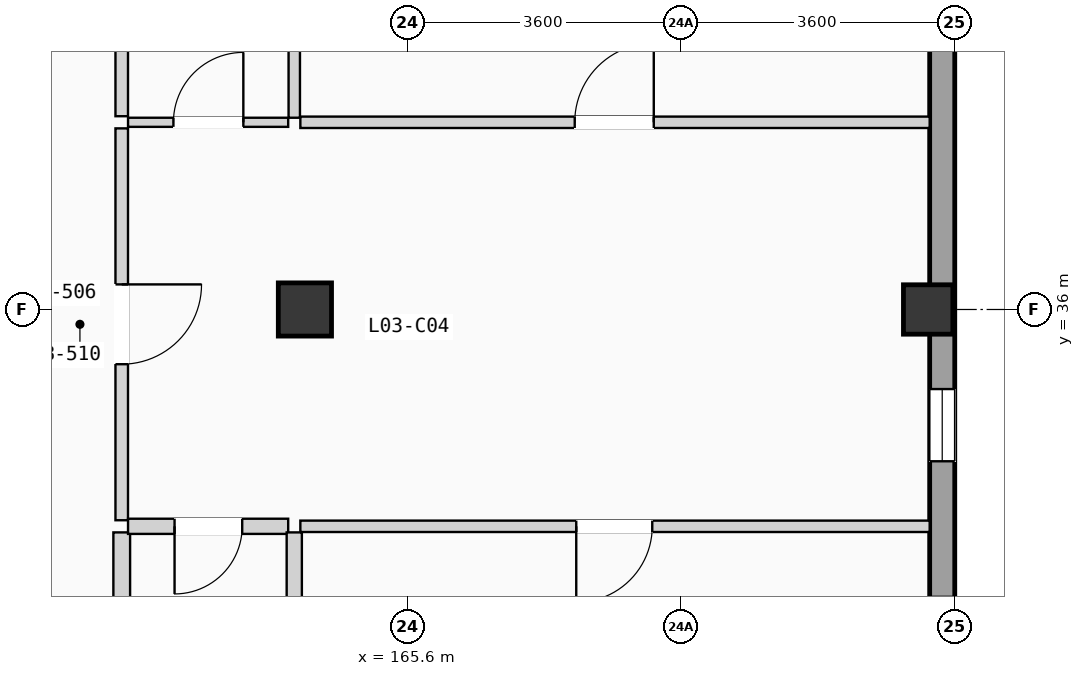
"""IFC4 building model, lengths in metres.
Left out: names, types, materials, properties, quantities, classifications, styles, units other than length and angle.
Written with IfcOpenShell. Run it as: python <this file> out.ifc"""

import sys

from ifc_helpers import new_model, si_unit, direction, frame, frame_2d, origin, origin_2d, place, context, subcontext, project, spatial, rectangle, extrude, element, fill, save


model = new_model("IFC4")
c1 = context("Model", 3, precision=1e-05, world=origin(), true_north=direction((0.0, 1.0)))
c2 = subcontext(c1, "Body", "Model", "MODEL_VIEW")
j1 = project(units=[si_unit("LENGTHUNIT", "METRE"), si_unit("PLANEANGLEUNIT", "RADIAN")], contexts=[c1])
p1 = place(None, origin())
s1 = spatial("IfcSite", under=j1, at=p1, CompositionType="ELEMENT")
p2 = place(p1, origin())
s2 = spatial("IfcBuilding", under=s1, at=p2, CompositionType="ELEMENT")
p3 = place(p2, frame((0.0, 0.0, 12.075)))
s3 = spatial("IfcBuildingStorey", under=s2, at=p3, CompositionType="ELEMENT", Elevation=12.075)
p4 = place(p3, frame((164.25, 36.0, 0.0), z_axis=(0.0, 0.0, 1.0), x_axis=(1.0, 0.0, 0.0)))
e1 = element("IfcColumn", 1, at=p4, inside=s3, PredefinedType="COLUMN", context=c2, shape_type="SweptSolid", body=[
    extrude(rectangle(XDim=0.7, YDim=0.7, at=origin_2d()), origin(), (0.0, 0.0, 1.0), 3.15),
])
p5 = place(p3, frame((172.45, 36.0, 0.0), z_axis=(0.0, 0.0, 1.0), x_axis=(1.0, 0.0, 0.0)))
e2 = element("IfcColumn", 2, at=p5, inside=s3, PredefinedType="COLUMN", context=c2, shape_type="SweptSolid", body=[
    extrude(rectangle(XDim=0.65, YDim=0.65, at=origin_2d()), origin(), (0.0, 0.0, 1.0), 3.15),
])
p6 = place(p3, frame((172.635, 0.33, 0.0), z_axis=(0.0, 0.0, 1.0), x_axis=(0.0, 1.0, 0.0)))
e3 = element("IfcWall", 3, at=p6, inside=s3, PredefinedType="SOLIDWALL", context=c2, shape_type="SweptSolid", body=[
    extrude(rectangle(XDim=49.74, YDim=0.33, at=frame_2d((24.87, 0.0))), origin(), (0.0, 0.0, 1.0), 2.89),
])
p7 = place(p6, frame((9.46, 0.0, 0.705)))
e4 = element("IfcOpeningElement", 4, at=p7, cuts=e3, PredefinedType="OPENING", context=c2, shape_type="SweptSolid", body=[
    extrude(rectangle(XDim=2.15, YDim=1.5, at=frame_2d((1.075, 0.75))), frame((0.0, 0.175, 0.0), z_axis=(0.0, -1.0, 0.0), x_axis=(1.0, 0.0, 0.0)), (0.0, 0.0, 1.0), 0.35),
])
p8 = place(p6, frame((16.61, 0.0, 0.555)))
e5 = element("IfcOpeningElement", 5, at=p8, cuts=e3, PredefinedType="OPENING", context=c2, shape_type="SweptSolid", body=[
    extrude(rectangle(XDim=2.15, YDim=1.65, at=frame_2d((1.075, 0.825))), frame((0.0, 0.175, 0.0), z_axis=(0.0, -1.0, 0.0), x_axis=(1.0, 0.0, 0.0)), (0.0, 0.0, 1.0), 0.35),
])
p9 = place(p6, frame((24.395, 0.0, 0.85)))
e6 = element("IfcOpeningElement", 6, at=p9, cuts=e3, PredefinedType="OPENING", context=c2, shape_type="SweptSolid", body=[
    extrude(rectangle(XDim=0.95, YDim=1.2, at=frame_2d((0.475, 0.6))), frame((0.0, 0.175, 0.0), z_axis=(0.0, -1.0, 0.0), x_axis=(1.0, 0.0, 0.0)), (0.0, 0.0, 1.0), 0.35),
])
p10 = place(p6, frame((33.673, 0.0, 0.85)))
e7 = element("IfcOpeningElement", 7, at=p10, cuts=e3, PredefinedType="OPENING", context=c2, shape_type="SweptSolid", body=[
    extrude(rectangle(XDim=0.95, YDim=1.2, at=frame_2d((0.475, 0.6))), frame((0.0, 0.175, 0.0), z_axis=(0.0, -1.0, 0.0), x_axis=(1.0, 0.0, 0.0)), (0.0, 0.0, 1.0), 0.35),
])
p11 = place(p6, frame((29.589, 0.0, 0.855)))
e8 = element("IfcOpeningElement", 8, at=p11, cuts=e3, PredefinedType="OPENING", context=c2, shape_type="SweptSolid", body=[
    extrude(rectangle(XDim=2.3, YDim=1.35, at=frame_2d((1.15, 0.675))), frame((0.0, 0.175, 0.0), z_axis=(0.0, -1.0, 0.0), x_axis=(1.0, 0.0, 0.0)), (0.0, 0.0, 1.0), 0.35),
])
p12 = place(p6, frame((39.191, 0.0, 0.705)))
e9 = element("IfcOpeningElement", 9, at=p12, cuts=e3, PredefinedType="OPENING", context=c2, shape_type="SweptSolid", body=[
    extrude(rectangle(XDim=2.3, YDim=1.5, at=frame_2d((1.15, 0.75))), frame((0.0, 0.175, 0.0), z_axis=(0.0, -1.0, 0.0), x_axis=(1.0, 0.0, 0.0)), (0.0, 0.0, 1.0), 0.35),
])
p13 = place(p3, frame((161.84, 33.227, 0.0), z_axis=(0.0, 0.0, 1.0), x_axis=(0.0, 1.0, 0.0)))
e10 = element("IfcWall", 10, at=p13, inside=s3, PredefinedType="PARTITIONING", context=c2, shape_type="SweptSolid", body=[
    extrude(rectangle(XDim=5.156, YDim=0.165, at=frame_2d((2.578, 0.0))), origin(), (0.0, 0.0, 1.0), 2.87),
])
p14 = place(p13, frame((2.053, 0.0, 0.0)))
e11 = element("IfcOpeningElement", 11, at=p14, cuts=e10, PredefinedType="OPENING", context=c2, shape_type="SweptSolid", body=[
    extrude(rectangle(XDim=1.05, YDim=2.13, at=frame_2d((0.525, 1.065))), frame((0.0, 0.093, 0.0), z_axis=(0.0, -1.0, 0.0), x_axis=(1.0, 0.0, 0.0)), (0.0, 0.0, 1.0), 0.185),
])
p15 = place(p3, frame((161.84, 28.81, 0.0), z_axis=(0.0, 0.0, 1.0), x_axis=(0.0, 1.0, 0.0)))
e12 = element("IfcWall", 12, at=p15, inside=s3, PredefinedType="PLUMBINGWALL", context=c2, shape_type="SweptSolid", body=[
    extrude(rectangle(XDim=4.257, YDim=0.22, at=frame_2d((2.128, 0.0))), origin(), (0.0, 0.0, 1.0), 2.87),
])
p16 = place(p3, frame((161.84, 38.543, 0.0), z_axis=(0.0, 0.0, 1.0), x_axis=(0.0, 1.0, 0.0)))
e13 = element("IfcWall", 13, at=p16, inside=s3, PredefinedType="PARTITIONING", context=c2, shape_type="SweptSolid", body=[
    extrude(rectangle(XDim=4.257, YDim=0.165, at=frame_2d((2.128, 0.0))), origin(), (0.0, 0.0, 1.0), 2.87),
])
p17 = place(p3, frame((161.923, 33.147, 0.0), z_axis=(0.0, 0.0, 1.0), x_axis=(1.0, 0.0, 0.0)))
e14 = element("IfcWall", 14, at=p17, inside=s3, PredefinedType="PLUMBINGWALL", context=c2, shape_type="SweptSolid", body=[
    extrude(rectangle(XDim=2.107, YDim=0.2, at=frame_2d((1.053, 0.0))), origin(), (0.0, 0.0, 1.0), 2.87),
])
p18 = place(p17, frame((0.612, 0.0, 0.0)))
e15 = element("IfcOpeningElement", 15, at=p18, cuts=e14, PredefinedType="OPENING", context=c2, shape_type="SweptSolid", body=[
    extrude(rectangle(XDim=0.89, YDim=2.03, at=frame_2d((0.445, 1.015))), frame((0.0, 0.11, 0.0), z_axis=(0.0, -1.0, 0.0), x_axis=(1.0, 0.0, 0.0)), (0.0, 0.0, 1.0), 0.22),
])
p19 = place(p3, frame((161.923, 38.463, 0.0), z_axis=(0.0, 0.0, 1.0), x_axis=(1.0, 0.0, 0.0)))
e16 = element("IfcWall", 16, at=p19, inside=s3, PredefinedType="PARTITIONING", context=c2, shape_type="SweptSolid", body=[
    extrude(rectangle(XDim=2.107, YDim=0.12, at=frame_2d((1.053, 0.0))), origin(), (0.0, 0.0, 1.0), 2.87),
])
p20 = place(p19, frame((0.597, 0.0, 0.0)))
e17 = element("IfcOpeningElement", 17, at=p20, cuts=e16, PredefinedType="OPENING", context=c2, shape_type="SweptSolid", body=[
    extrude(rectangle(XDim=0.92, YDim=2.02, at=frame_2d((0.46, 1.01))), frame((0.0, 0.07, 0.0), z_axis=(0.0, -1.0, 0.0), x_axis=(1.0, 0.0, 0.0)), (0.0, 0.0, 1.0), 0.14),
])
p21 = place(p3, frame((164.19, 33.147, 0.0), z_axis=(0.0, 0.0, 1.0), x_axis=(1.0, 0.0, 0.0)))
e18 = element("IfcWall", 18, at=p21, inside=s3, PredefinedType="PARTITIONING", context=c2, shape_type="SweptSolid", body=[
    extrude(rectangle(XDim=8.28, YDim=0.15, at=frame_2d((4.14, 0.0))), origin(), (0.0, 0.0, 1.0), 2.87),
])
p22 = place(p21, frame((3.63, 0.0, 0.0)))
e19 = element("IfcOpeningElement", 19, at=p22, cuts=e18, PredefinedType="OPENING", context=c2, shape_type="SweptSolid", body=[
    extrude(rectangle(XDim=1.0, YDim=2.06, at=frame_2d((0.5, 1.03))), frame((0.0, 0.085, 0.0), z_axis=(0.0, -1.0, 0.0), x_axis=(1.0, 0.0, 0.0)), (0.0, 0.0, 1.0), 0.17),
])
p23 = place(p3, frame((164.19, 38.463, 0.0), z_axis=(0.0, 0.0, 1.0), x_axis=(1.0, 0.0, 0.0)))
e20 = element("IfcWall", 20, at=p23, inside=s3, PredefinedType="PARTITIONING", context=c2, shape_type="SweptSolid", body=[
    extrude(rectangle(XDim=8.28, YDim=0.15, at=frame_2d((4.14, 0.0))), origin(), (0.0, 0.0, 1.0), 2.87),
])
p24 = place(p23, frame((3.61, 0.0, 0.0)))
e21 = element("IfcOpeningElement", 21, at=p24, cuts=e20, PredefinedType="OPENING", context=c2, shape_type="SweptSolid", body=[
    extrude(rectangle(XDim=1.04, YDim=2.08, at=frame_2d((0.52, 1.04))), frame((0.0, 0.085, 0.0), z_axis=(0.0, -1.0, 0.0), x_axis=(1.0, 0.0, 0.0)), (0.0, 0.0, 1.0), 0.17),
])
p25 = place(p3, frame((164.11, 28.81, 0.0), z_axis=(0.0, 0.0, 1.0), x_axis=(0.0, 1.0, 0.0)))
e22 = element("IfcWall", 22, at=p25, inside=s3, PredefinedType="PLUMBINGWALL", context=c2, shape_type="SweptSolid", body=[
    extrude(rectangle(XDim=4.257, YDim=0.2, at=frame_2d((2.128, 0.0))), origin(), (0.0, 0.0, 1.0), 2.87),
])
p26 = place(p3, frame((164.11, 38.523, 0.0), z_axis=(0.0, 0.0, 1.0), x_axis=(0.0, 1.0, 0.0)))
e23 = element("IfcWall", 23, at=p26, inside=s3, PredefinedType="PARTITIONING", context=c2, shape_type="SweptSolid", body=[
    extrude(rectangle(XDim=4.277, YDim=0.15, at=frame_2d((2.139, 0.0))), origin(), (0.0, 0.0, 1.0), 2.87),
])
p27 = place(p10, origin())
e24 = element("IfcWindow", 24, at=p27, inside=s3, PartitioningType="SINGLE_PANEL", PredefinedType="WINDOW", context=c2, shape_type="SweptSolid", body=[
    extrude(rectangle(XDim=0.95, YDim=1.2, at=frame_2d((0.475, 0.6))), frame((0.0, 0.03, 0.0), z_axis=(0.0, -1.0, 0.0), x_axis=(1.0, 0.0, 0.0)), (0.0, 0.0, 1.0), 0.06),
])
fill(e7, e24)
p28 = place(p14, frame((1.05, 0.0, 0.0), z_axis=(0.0, 0.0, 1.0), x_axis=(-1.0, 0.0, 0.0)))
e25 = element("IfcDoor", 25, at=p28, inside=s3, OperationType="SINGLE_SWING_RIGHT", PredefinedType="DOOR", context=c2, shape_type="SweptSolid", body=[
    extrude(rectangle(XDim=1.05, YDim=2.13, at=frame_2d((0.525, 1.065))), frame((0.0, 0.025, 0.0), z_axis=(0.0, -1.0, 0.0), x_axis=(1.0, 0.0, 0.0)), (0.0, 0.0, 1.0), 0.05),
])
fill(e11, e25)
p29 = place(p18, frame((0.89, 0.0, 0.0), z_axis=(0.0, 0.0, 1.0), x_axis=(-1.0, 0.0, 0.0)))
e26 = element("IfcDoor", 26, at=p29, inside=s3, OperationType="SINGLE_SWING_LEFT", PredefinedType="DOOR", context=c2, shape_type="SweptSolid", body=[
    extrude(rectangle(XDim=0.89, YDim=2.03, at=frame_2d((0.445, 1.015))), frame((0.0, 0.025, 0.0), z_axis=(0.0, -1.0, 0.0), x_axis=(1.0, 0.0, 0.0)), (0.0, 0.0, 1.0), 0.05),
])
fill(e15, e26)
p30 = place(p20, origin())
e27 = element("IfcDoor", 27, at=p30, inside=s3, OperationType="SINGLE_SWING_RIGHT", PredefinedType="DOOR", context=c2, shape_type="SweptSolid", body=[
    extrude(rectangle(XDim=0.92, YDim=2.02, at=frame_2d((0.46, 1.01))), frame((0.0, 0.025, 0.0), z_axis=(0.0, -1.0, 0.0), x_axis=(1.0, 0.0, 0.0)), (0.0, 0.0, 1.0), 0.05),
])
fill(e17, e27)
p31 = place(p22, frame((1.0, 0.0, 0.0), z_axis=(0.0, 0.0, 1.0), x_axis=(-1.0, 0.0, 0.0)))
e28 = element("IfcDoor", 28, at=p31, inside=s3, OperationType="SINGLE_SWING_LEFT", PredefinedType="DOOR", context=c2, shape_type="SweptSolid", body=[
    extrude(rectangle(XDim=1.0, YDim=2.06, at=frame_2d((0.5, 1.03))), frame((0.0, 0.025, 0.0), z_axis=(0.0, -1.0, 0.0), x_axis=(1.0, 0.0, 0.0)), (0.0, 0.0, 1.0), 0.05),
])
fill(e19, e28)
p32 = place(p24, origin())
e29 = element("IfcDoor", 29, at=p32, inside=s3, OperationType="SINGLE_SWING_RIGHT", PredefinedType="DOOR", context=c2, shape_type="SweptSolid", body=[
    extrude(rectangle(XDim=1.04, YDim=2.08, at=frame_2d((0.52, 1.04))), frame((0.0, 0.025, 0.0), z_axis=(0.0, -1.0, 0.0), x_axis=(1.0, 0.0, 0.0)), (0.0, 0.0, 1.0), 0.05),
])
fill(e21, e29)
save(model, sys.argv[1])
